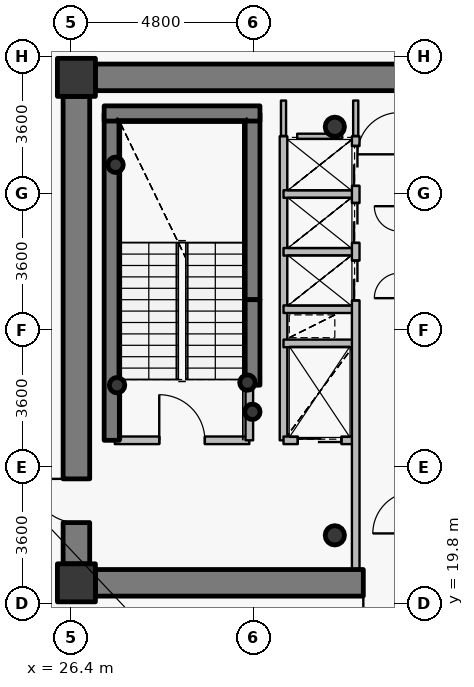
"""IFC4 building model, lengths in metres.
Left out: names, types, materials, properties, quantities, classifications, styles, units other than length and angle.
Written with IfcOpenShell. Run it as: python <this file> out.ifc"""

import sys

from ifc_helpers import new_model, si_unit, direction, frame, frame_2d, origin, origin_2d, place, context, subcontext, project, spatial, rectangle, hollow_circle, extrude, source, transform, mapped, element, fill, save


model = new_model("IFC4")
c1 = context("Model", 3, precision=1e-05, world=origin(), true_north=direction((0.0, 1.0)))
c2 = subcontext(c1, "Body", "Model", "MODEL_VIEW")
j1 = project(units=[si_unit("LENGTHUNIT", "METRE"), si_unit("PLANEANGLEUNIT", "RADIAN")], contexts=[c1])
p1 = place(None, origin())
s1 = spatial("IfcSite", under=j1, at=p1, CompositionType="ELEMENT")
p2 = place(p1, origin())
s2 = spatial("IfcBuilding", under=s1, at=p2, CompositionType="ELEMENT")
p3 = place(p2, frame((0.0, 0.0, 259.05)))
s3 = spatial("IfcBuildingStorey", under=s2, at=p3, CompositionType="ELEMENT", Elevation=259.05)
for number, where, z_axis, x_axis in (
    (1, (26.55, 20.35, 0.0), (0.0, 0.0, 1.0), (1.0, 0.0, 0.0)),
    (2, (26.55, 33.65, 0.0), (0.0, 0.0, 1.0), (1.0, 0.0, 0.0)),
):
    element("IfcColumn", number, at=place(p3, frame(where, z_axis=z_axis, x_axis=x_axis)), inside=s3, PredefinedType="COLUMN", context=c2, shape_type="SweptSolid", body=[
        extrude(rectangle(XDim=1.0, YDim=1.0, at=origin_2d()), origin(), (0.0, 0.0, 1.0), 3.75),
    ])
for number, where, z_axis, x_axis in (
    (3, (33.35, 21.6, 0.0), (0.0, 0.0, 1.0), (1.0, 0.0, 0.0)),
    (4, (33.35, 32.35, 0.0), (0.0, 0.0, 1.0), (1.0, 0.0, 0.0)),
):
    element("IfcColumn", number, at=place(p3, frame(where, z_axis=z_axis, x_axis=x_axis)), inside=s3, PredefinedType="COLUMN", context=c2, shape_type="SweptSolid", body=[
        extrude(hollow_circle(Radius=0.254, WallThickness=0.02, at=origin_2d()), origin(), (0.0, 0.0, 1.0), 3.75),
    ])
p4 = place(p3, frame((27.48, 24.1, 0.0), z_axis=(0.0, 0.0, 1.0), x_axis=(0.0, 1.0, 0.0)))
e5 = element("IfcWall", 5, at=p4, inside=s3, PredefinedType="SHEAR", context=c2, shape_type="SweptSolid", body=[
    extrude(rectangle(XDim=8.6, YDim=0.4, at=frame_2d((4.3, 0.0))), origin(), (0.0, 0.0, 1.0), 3.75),
])
p5 = place(p3, frame((31.18, 27.8, 0.0), z_axis=(0.0, 0.0, 1.0), x_axis=(0.0, 1.0, 0.0)))
e6 = element("IfcWall", 6, at=p5, inside=s3, PredefinedType="SHEAR", context=c2, shape_type="SweptSolid", body=[
    extrude(rectangle(XDim=4.9, YDim=0.4, at=frame_2d((2.45, 0.0))), origin(), (0.0, 0.0, 1.0), 3.75),
])
p6 = place(p3, frame((27.28, 32.7, 0.0), z_axis=(0.0, 0.0, 1.0), x_axis=(1.0, 0.0, 0.0)))
e7 = element("IfcWall", 7, at=p6, inside=s3, PredefinedType="SHEAR", context=c2, shape_type="SweptSolid", body=[
    extrude(rectangle(XDim=4.1, YDim=0.4, at=frame_2d((2.05, 0.0))), origin(), (0.0, 0.0, 1.0), 3.75),
])
for number, where, z_axis, x_axis in (
    (8, (27.58, 31.35, 0.0), (0.0, 0.0, 1.0), (1.0, 0.0, 0.0)),
    (9, (31.05, 25.62, 0.0), (0.0, 0.0, 1.0), (1.0, 0.0, 0.0)),
    (10, (31.18, 24.85, 0.0), (0.0, 0.0, 1.0), (1.0, 0.0, 0.0)),
    (11, (27.62, 25.55, 0.0), (0.0, 0.0, 1.0), (1.0, 0.0, 0.0)),
):
    element("IfcColumn", number, at=place(p3, frame(where, z_axis=z_axis, x_axis=x_axis)), inside=s3, PredefinedType="COLUMN", context=c2, shape_type="SweptSolid", body=[
        extrude(hollow_circle(Radius=0.203, WallThickness=0.016, at=origin_2d()), origin(), (0.0, 0.0, 1.0), 3.75),
    ])
p7 = place(p3, frame((27.05, 33.65, 0.0), z_axis=(0.0, 0.0, 1.0), x_axis=(1.0, 0.0, 0.0)))
e12 = element("IfcWall", 12, at=p7, inside=s3, PredefinedType="SHEAR", context=c2, shape_type="SweptSolid", body=[
    extrude(rectangle(XDim=17.9, YDim=0.7, at=frame_2d((8.95, 0.0))), origin(), (0.0, 0.0, 1.0), 3.0),
])
p8 = place(p7, frame((13.675, 0.0, 0.0)))
e13 = element("IfcOpeningElement", 13, at=p8, cuts=e12, PredefinedType="OPENING", context=c2, shape_type="SweptSolid", body=[
    extrude(rectangle(XDim=1.15, YDim=2.15, at=origin_2d()), frame((0.575, 0.36, 1.075), z_axis=(0.0, -1.0, 0.0), x_axis=(1.0, 0.0, 0.0)), (0.0, 0.0, 1.0), 0.72),
])
p9 = place(p3, frame((44.95, 20.35, 0.0), z_axis=(0.0, 0.0, 1.0), x_axis=(-1.0, 0.0, 0.0)))
e14 = element("IfcWall", 14, at=p9, inside=s3, PredefinedType="SHEAR", context=c2, shape_type="SweptSolid", body=[
    extrude(rectangle(XDim=17.9, YDim=0.7, at=frame_2d((8.95, 0.0))), origin(), (0.0, 0.0, 1.0), 3.0),
])
p10 = place(p9, frame((9.7, 0.0, 0.0)))
e15 = element("IfcOpeningElement", 15, at=p10, cuts=e14, PredefinedType="OPENING", context=c2, shape_type="SweptSolid", body=[
    extrude(rectangle(XDim=1.15, YDim=2.15, at=origin_2d()), frame((0.575, 0.36, 1.075), z_axis=(0.0, -1.0, 0.0), x_axis=(1.0, 0.0, 0.0)), (0.0, 0.0, 1.0), 0.72),
])
p11 = place(p3, frame((26.55, 20.85, 0.0), z_axis=(0.0, 0.0, 1.0), x_axis=(0.0, 1.0, 0.0)))
e16 = element("IfcWall", 16, at=p11, inside=s3, PredefinedType="SHEAR", context=c2, shape_type="SweptSolid", body=[
    extrude(rectangle(XDim=12.3, YDim=0.7, at=frame_2d((6.15, 0.0))), origin(), (0.0, 0.0, 1.0), 3.0),
])
p12 = place(p11, frame((1.085, 0.0, 0.0)))
e17 = element("IfcOpeningElement", 17, at=p12, cuts=e16, PredefinedType="OPENING", context=c2, shape_type="SweptSolid", body=[
    extrude(rectangle(XDim=1.15, YDim=2.15, at=origin_2d()), frame((0.575, 0.36, 1.075), z_axis=(0.0, -1.0, 0.0), x_axis=(1.0, 0.0, 0.0)), (0.0, 0.0, 1.0), 0.72),
])
p13 = place(p3, frame((31.18, 25.55, 0.0), z_axis=(0.0, 0.0, 1.0), x_axis=(0.0, 1.0, 0.0)))
e18 = element("IfcWall", 18, at=p13, inside=s3, PredefinedType="SHEAR", context=c2, shape_type="SweptSolid", body=[
    extrude(rectangle(XDim=2.25, YDim=0.4, at=frame_2d((1.125, 0.0))), origin(), (0.0, 0.0, 1.0), 3.05),
])
p14 = place(p3, frame((27.56, 24.1, 0.0), z_axis=(0.0, 0.0, 1.0), x_axis=(1.0, 0.0, 0.0)))
e19 = element("IfcWall", 19, at=p14, inside=s3, PredefinedType="PARTITIONING", context=c2, shape_type="SweptSolid", body=[
    extrude(rectangle(XDim=3.54, YDim=0.2, at=frame_2d((1.77, 0.0))), origin(), (0.0, 0.0, 1.0), 3.45),
])
p15 = place(p14, frame((1.17, 0.0, 0.0)))
e20 = element("IfcOpeningElement", 20, at=p15, cuts=e19, PredefinedType="OPENING", context=c2, shape_type="SweptSolid", body=[
    extrude(rectangle(XDim=1.2, YDim=2.15, at=origin_2d()), frame((0.6, 0.11, 1.075), z_axis=(0.0, -1.0, 0.0), x_axis=(1.0, 0.0, 0.0)), (0.0, 0.0, 1.0), 0.22),
])
p16 = place(p3, frame((31.1, 24.1, 0.0), z_axis=(0.0, 0.0, 1.0), x_axis=(0.0, 1.0, 0.0)))
e21 = element("IfcWall", 21, at=p16, inside=s3, PredefinedType="PARTITIONING", context=c2, shape_type="SweptSolid", body=[
    extrude(rectangle(XDim=1.44, YDim=0.2, at=frame_2d((0.72, 0.0))), origin(), (0.0, 0.0, 1.0), 3.45),
])
p17 = place(p3, frame((32.0, 24.1, 0.0), z_axis=(0.0, 0.0, 1.0), x_axis=(0.0, 1.0, 0.0)))
e22 = element("IfcWall", 22, at=p17, inside=s3, PredefinedType="PARTITIONING", context=c2, shape_type="SweptSolid", body=[
    extrude(rectangle(XDim=8.0, YDim=0.2, at=frame_2d((4.0, 0.0))), origin(), (0.0, 0.0, 1.0), 3.45),
])
p18 = place(p3, frame((32.0, 24.1, 0.0), z_axis=(0.0, 0.0, 1.0), x_axis=(1.0, 0.0, 0.0)))
e23 = element("IfcWall", 23, at=p18, inside=s3, PredefinedType="PARTITIONING", context=c2, shape_type="SweptSolid", body=[
    extrude(rectangle(XDim=1.9, YDim=0.2, at=frame_2d((0.95, 0.0))), origin(), (0.0, 0.0, 1.0), 3.035),
])
p19 = place(p18, frame((0.375, 0.0, 0.0)))
e24 = element("IfcOpeningElement", 24, at=p19, cuts=e23, PredefinedType="OPENING", context=c2, shape_type="SweptSolid", body=[
    extrude(rectangle(XDim=1.15, YDim=2.15, at=origin_2d()), frame((0.575, 0.11, 1.075), z_axis=(0.0, -1.0, 0.0), x_axis=(1.0, 0.0, 0.0)), (0.0, 0.0, 1.0), 0.22),
])
for number, where, z_axis, x_axis in (
    (25, (32.0, 26.65, 0.0), (0.0, 0.0, 1.0), (1.0, 0.0, 0.0)),
    (26, (32.0, 27.55, 0.0), (0.0, 0.0, 1.0), (1.0, 0.0, 0.0)),
    (27, (32.0, 29.06, 0.0), (0.0, 0.0, 1.0), (1.0, 0.0, 0.0)),
    (28, (32.0, 30.58, 0.0), (0.0, 0.0, 1.0), (1.0, 0.0, 0.0)),
):
    element("IfcWall", number, at=place(p3, frame(where, z_axis=z_axis, x_axis=x_axis)), inside=s3, PredefinedType="PARTITIONING", context=c2, shape_type="SweptSolid", body=[
        extrude(rectangle(XDim=1.9, YDim=0.2, at=frame_2d((0.95, 0.0))), origin(), (0.0, 0.0, 1.0), 3.035),
    ])
p20 = place(p3, frame((33.9, 20.7, 0.0), z_axis=(0.0, 0.0, 1.0), x_axis=(0.0, 1.0, 0.0)))
e29 = element("IfcWall", 29, at=p20, inside=s3, PredefinedType="PARTITIONING", context=c2, shape_type="SweptSolid", body=[
    extrude(rectangle(XDim=11.4, YDim=0.2, at=frame_2d((5.7, 0.0))), origin(), (0.0, 0.0, 1.0), 3.035),
])
p21 = place(p20, frame((7.08, 0.0, 0.0)))
e30 = element("IfcOpeningElement", 30, at=p21, cuts=e29, PredefinedType="OPENING", context=c2, shape_type="SweptSolid", body=[
    extrude(rectangle(XDim=1.05, YDim=2.15, at=origin_2d()), frame((0.525, 0.11, 1.075), z_axis=(0.0, -1.0, 0.0), x_axis=(1.0, 0.0, 0.0)), (0.0, 0.0, 1.0), 0.22),
])
p22 = place(p20, frame((8.595, 0.0, 0.0)))
e31 = element("IfcOpeningElement", 31, at=p22, cuts=e29, PredefinedType="OPENING", context=c2, shape_type="SweptSolid", body=[
    extrude(rectangle(XDim=1.05, YDim=2.15, at=origin_2d()), frame((0.525, 0.11, 1.075), z_axis=(0.0, -1.0, 0.0), x_axis=(1.0, 0.0, 0.0)), (0.0, 0.0, 1.0), 0.22),
])
p23 = place(p20, frame((10.095, 0.0, 0.0)))
e32 = element("IfcOpeningElement", 32, at=p23, cuts=e29, PredefinedType="OPENING", context=c2, shape_type="SweptSolid", body=[
    extrude(rectangle(XDim=1.05, YDim=2.15, at=origin_2d()), frame((0.525, 0.11, 1.075), z_axis=(0.0, -1.0, 0.0), x_axis=(1.0, 0.0, 0.0)), (0.0, 0.0, 1.0), 0.22),
])
p24 = place(p3, frame((32.36, 32.1, 0.0), z_axis=(0.0, 0.0, 1.0), x_axis=(1.0, 0.0, 0.0)))
e33 = element("IfcWall", 33, at=p24, inside=s3, PredefinedType="PARTITIONING", context=c2, shape_type="SweptSolid", body=[
    extrude(rectangle(XDim=1.18, YDim=0.135, at=frame_2d((0.59, 0.0))), origin(), (0.0, 0.0, 1.0), 3.035),
])
p25 = place(p3, frame((32.0, 33.04, 0.0), z_axis=(0.0, 0.0, 1.0), x_axis=(0.0, -1.0, 0.0)))
e34 = element("IfcWall", 34, at=p25, inside=s3, PredefinedType="PARTITIONING", context=c2, shape_type="SweptSolid", body=[
    extrude(rectangle(XDim=0.93, YDim=0.135, at=frame_2d((0.465, 0.0))), origin(), (0.0, 0.0, 1.0), 2.985),
])
p26 = place(p3, frame((33.9, 32.11, 0.0), z_axis=(0.0, 0.0, 1.0), x_axis=(0.0, 1.0, 0.0)))
e35 = element("IfcWall", 35, at=p26, inside=s3, PredefinedType="PARTITIONING", context=c2, shape_type="SweptSolid", body=[
    extrude(rectangle(XDim=0.93, YDim=0.135, at=frame_2d((0.465, 0.0))), origin(), (0.0, 0.0, 1.0), 3.035),
])
p27 = place(p3, frame((27.04, 34.0, 0.0), z_axis=(0.0, 0.0, 1.0), x_axis=(-1.0, 0.0, 0.0)))
e36 = element("IfcWall", 36, at=p27, inside=s3, PredefinedType="PARTITIONING", context=c2, shape_type="SweptSolid", body=[
    extrude(rectangle(XDim=0.84, YDim=0.135, at=frame_2d((0.42, 0.0))), origin(), (0.0, 0.0, 1.0), 2.885),
])
p28 = place(p3, frame((26.2, 33.692, 0.0), z_axis=(0.0, 0.0, 1.0), x_axis=(0.0, -1.0, 0.0)))
e37 = element("IfcWall", 37, at=p28, inside=s3, PredefinedType="PARTITIONING", context=c2, shape_type="SweptSolid", body=[
    extrude(rectangle(XDim=0.532, YDim=0.135, at=frame_2d((0.266, 0.0))), origin(), (0.0, 0.0, 1.0), 3.45),
])
p29 = place(p3, frame((26.2, 20.84, 0.0), z_axis=(0.0, 0.0, 1.0), x_axis=(0.0, -1.0, 0.0)))
e38 = element("IfcWall", 38, at=p29, inside=s3, PredefinedType="PARTITIONING", context=c2, shape_type="SweptSolid", body=[
    extrude(rectangle(XDim=0.84, YDim=0.135, at=frame_2d((0.42, 0.0))), origin(), (0.0, 0.0, 1.0), 3.45),
])
p30 = place(p3, frame((26.508, 20.0, 0.0), z_axis=(0.0, 0.0, 1.0), x_axis=(1.0, 0.0, 0.0)))
e39 = element("IfcWall", 39, at=p30, inside=s3, PredefinedType="PARTITIONING", context=c2, shape_type="SweptSolid", body=[
    extrude(rectangle(XDim=0.532, YDim=0.135, at=frame_2d((0.266, 0.0))), origin(), (0.0, 0.0, 1.0), 2.885),
])
m1 = source(origin(), c2, "Body", "SweptSolid", [
    extrude(rectangle(XDim=1.15, YDim=2.15, at=origin_2d()), frame((0.575, 0.025, 1.075), z_axis=(0.0, -1.0, 0.0), x_axis=(1.0, 0.0, 0.0)), (0.0, 0.0, 1.0), 0.05),
])
p31 = place(p12, origin())
e40 = element("IfcDoor", 40, at=p31, inside=s3, OperationType="SINGLE_SWING_RIGHT", PredefinedType="DOOR", context=c2, shape_type="MappedRepresentation", body=[
    mapped(m1, transform((0.0, 0.0, 0.0), x_axis=(1.0, 0.0, 0.0), y_axis=(0.0, 1.0, 0.0), z_axis=(0.0, 0.0, 1.0), scale=1.0)),
])
fill(e17, e40)
p32 = place(p10, origin())
e41 = element("IfcDoor", 41, at=p32, inside=s3, OperationType="SINGLE_SWING_RIGHT", PredefinedType="DOOR", context=c2, shape_type="MappedRepresentation", body=[
    mapped(m1, transform((0.0, 0.0, 0.0), x_axis=(1.0, 0.0, 0.0), y_axis=(0.0, 1.0, 0.0), z_axis=(0.0, 0.0, 1.0), scale=1.0)),
])
fill(e15, e41)
m2 = source(origin(), c2, "Body", "SweptSolid", [
    extrude(rectangle(XDim=1.2, YDim=2.15, at=origin_2d()), frame((0.6, 0.025, 1.075), z_axis=(0.0, -1.0, 0.0), x_axis=(1.0, 0.0, 0.0)), (0.0, 0.0, 1.0), 0.05),
])
p33 = place(p15, origin())
e42 = element("IfcDoor", 42, at=p33, inside=s3, OperationType="SINGLE_SWING_LEFT", PredefinedType="DOOR", context=c2, shape_type="MappedRepresentation", body=[
    mapped(m2, transform((0.0, 0.0, 0.0), x_axis=(1.0, 0.0, 0.0), y_axis=(0.0, 1.0, 0.0), z_axis=(0.0, 0.0, 1.0), scale=1.0)),
])
fill(e20, e42)
m3 = source(origin(), c2, "Body", "SweptSolid", [
    extrude(rectangle(XDim=1.15, YDim=2.15, at=origin_2d()), frame((0.575, 0.025, 1.075), z_axis=(0.0, -1.0, 0.0), x_axis=(1.0, 0.0, 0.0)), (0.0, 0.0, 1.0), 0.05),
])
p34 = place(p19, origin())
e43 = element("IfcDoor", 43, at=p34, inside=s3, OperationType="DOUBLE_DOOR_SLIDING", PredefinedType="USERDEFINED", context=c2, shape_type="MappedRepresentation", body=[
    mapped(m3, transform((0.0, 0.0, 0.0), x_axis=(1.0, 0.0, 0.0), y_axis=(0.0, 1.0, 0.0), z_axis=(0.0, 0.0, 1.0), scale=1.0)),
])
fill(e24, e43)
m4 = source(origin(), c2, "Body", "SweptSolid", [
    extrude(rectangle(XDim=1.05, YDim=2.15, at=origin_2d()), frame((0.525, 0.025, 1.075), z_axis=(0.0, -1.0, 0.0), x_axis=(1.0, 0.0, 0.0)), (0.0, 0.0, 1.0), 0.05),
])
p35 = place(p21, origin())
e44 = element("IfcDoor", 44, at=p35, inside=s3, OperationType="DOUBLE_DOOR_SLIDING", PredefinedType="USERDEFINED", context=c2, shape_type="MappedRepresentation", body=[
    mapped(m4, transform((0.0, 0.0, 0.0), x_axis=(1.0, 0.0, 0.0), y_axis=(0.0, 1.0, 0.0), z_axis=(0.0, 0.0, 1.0), scale=1.0)),
])
fill(e30, e44)
p36 = place(p22, origin())
e45 = element("IfcDoor", 45, at=p36, inside=s3, OperationType="DOUBLE_DOOR_SLIDING", PredefinedType="USERDEFINED", context=c2, shape_type="MappedRepresentation", body=[
    mapped(m4, transform((0.0, 0.0, 0.0), x_axis=(1.0, 0.0, 0.0), y_axis=(0.0, 1.0, 0.0), z_axis=(0.0, 0.0, 1.0), scale=1.0)),
])
fill(e31, e45)
p37 = place(p23, origin())
e46 = element("IfcDoor", 46, at=p37, inside=s3, OperationType="DOUBLE_DOOR_SLIDING", PredefinedType="USERDEFINED", context=c2, shape_type="MappedRepresentation", body=[
    mapped(m4, transform((0.0, 0.0, 0.0), x_axis=(1.0, 0.0, 0.0), y_axis=(0.0, 1.0, 0.0), z_axis=(0.0, 0.0, 1.0), scale=1.0)),
])
fill(e32, e46)
save(model, sys.argv[1])
